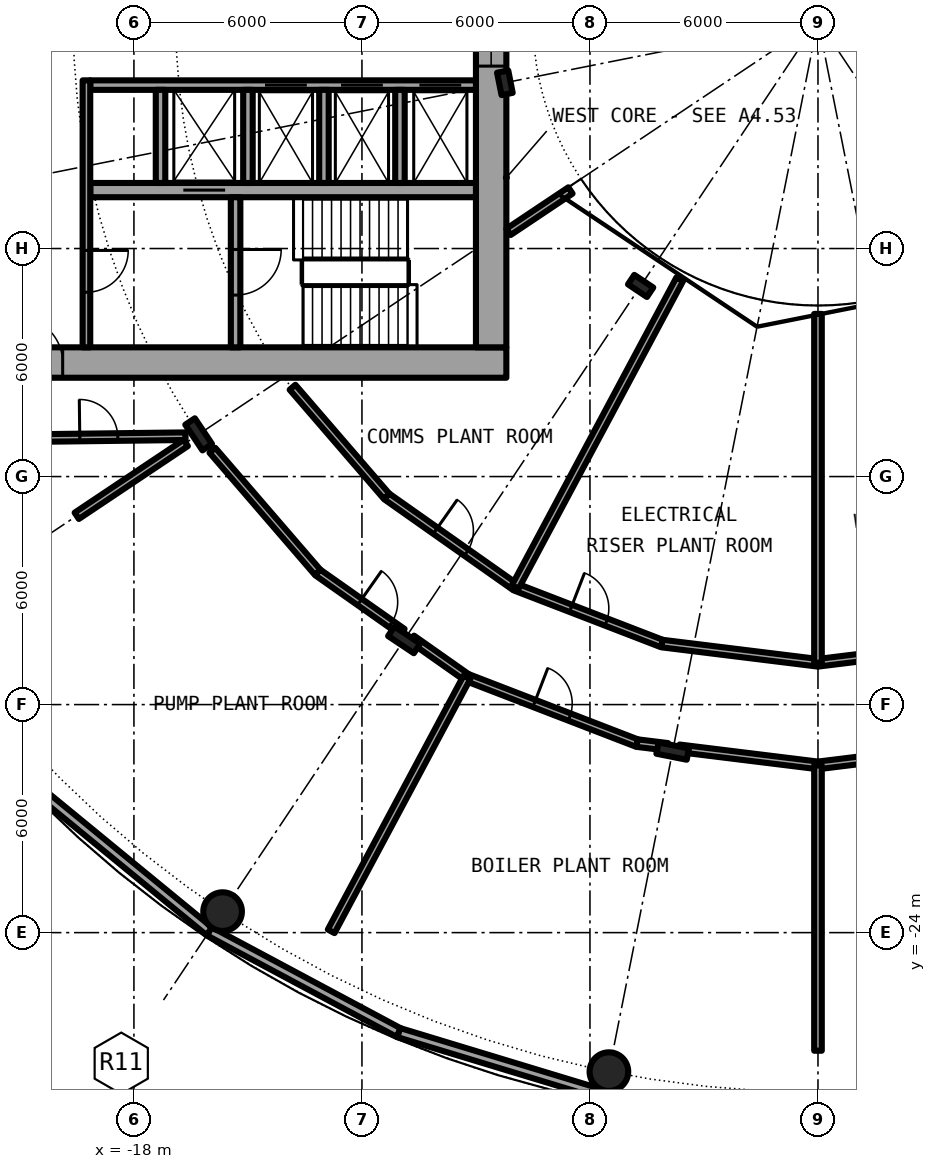
"""IFC4 building model, lengths in metres.
Left out: names, types, materials, properties, quantities, classifications, styles, units other than length and angle.
Written with IfcOpenShell. Run it as: python <this file> out.ifc"""

import sys

from ifc_helpers import new_model, si_unit, direction, frame, frame_2d, origin, origin_2d, place, context, subcontext, project, spatial, rectangle, hollow_circle, i_section, extrude, element, fill, save


model = new_model("IFC4")
c1 = context("Model", 3, precision=1e-05, world=origin(), true_north=direction((0.0, 1.0)))
c2 = subcontext(c1, "Body", "Model", "MODEL_VIEW")
j1 = project(units=[si_unit("LENGTHUNIT", "METRE"), si_unit("PLANEANGLEUNIT", "RADIAN")], contexts=[c1])
p1 = place(None, origin())
s1 = spatial("IfcSite", under=j1, at=p1, CompositionType="ELEMENT")
p2 = place(p1, origin())
s2 = spatial("IfcBuilding", under=s1, at=p2, CompositionType="ELEMENT")
p3 = place(p2, frame((0.0, 0.0, 18.3)))
s3 = spatial("IfcBuildingStorey", under=s2, at=p3, CompositionType="ELEMENT", Elevation=18.3)
for number, where, z_axis, x_axis in (
    (1, (-15.667, -23.448, 0.0), (0.0, 0.0, 1.0), (1.0, 0.0, 0.0)),
    (2, (-5.501, -27.658, 0.0), (0.0, 0.0, 1.0), (1.0, 0.0, 0.0)),
):
    element("IfcColumn", number, at=place(p3, frame(where, z_axis=z_axis, x_axis=x_axis)), inside=s3, PredefinedType="COLUMN", context=c2, shape_type="SweptSolid", body=[
        extrude(hollow_circle(Radius=0.508, WallThickness=0.05, at=origin_2d()), origin(), (0.0, 0.0, 1.0), 4.5),
    ])
for number, where, z_axis, x_axis in (
    (3, (-16.297, -10.889, 0.0), (0.0, 0.0, 1.0), (-0.831, -0.556, 0.0)),
    (4, (-10.889, -16.297, 0.0), (0.0, 0.0, 1.0), (-0.556, -0.831, 0.0)),
    (5, (-3.824, -19.223, 0.0), (0.0, 0.0, 1.0), (-0.195, -0.981, 0.0)),
):
    element("IfcColumn", number, at=place(p3, frame(where, z_axis=z_axis, x_axis=x_axis)), inside=s3, PredefinedType="COLUMN", context=c2, shape_type="SweptSolid", body=[
        extrude(i_section(OverallWidth=0.303, OverallDepth=0.814, WebThickness=0.021, FlangeThickness=0.04, FilletRadius=0.03, at=origin_2d()), origin(), (0.0, 0.0, 1.0), 4.5),
    ])
for number, where, z_axis, x_axis in (
    (6, (-8.239, -1.639, 0.0), (0.0, 0.0, 1.0), (-0.981, -0.195, 0.0)),
    (7, (-4.667, -6.984, 0.0), (0.0, 0.0, 1.0), (-0.556, -0.831, 0.0)),
):
    element("IfcColumn", number, at=place(p3, frame(where, z_axis=z_axis, x_axis=x_axis)), inside=s3, PredefinedType="COLUMN", context=c2, shape_type="SweptSolid", body=[
        extrude(i_section(OverallWidth=0.3, OverallDepth=0.6, WebThickness=0.015, FlangeThickness=0.03, FilletRadius=0.027, at=origin_2d()), origin(), (0.0, 0.0, 1.0), 4.5),
    ])
p4 = place(p3, frame((-20.382, -20.382, 0.0), z_axis=(0.0, 0.0, 1.0), x_axis=(0.773001659186, -0.634403999748, 0.0)))
e8 = element("IfcWall", 8, at=p4, inside=s3, PredefinedType="SOLIDWALL", context=c2, shape_type="SweptSolid", body=[
    extrude(rectangle(XDim=5.651, YDim=0.25, at=frame_2d((2.825, 0.0))), origin(), (0.0, 0.0, 1.0), 4.15),
])
p5 = place(p3, frame((-16.014, -23.967, 0.0), z_axis=(0.0, 0.0, 1.0), x_axis=(0.881874058161, -0.471485042756, 0.0)))
e9 = element("IfcWall", 9, at=p5, inside=s3, PredefinedType="SOLIDWALL", context=c2, shape_type="SweptSolid", body=[
    extrude(rectangle(XDim=5.65, YDim=0.25, at=frame_2d((2.825, 0.0))), origin(), (0.0, 0.0, 1.0), 4.15),
])
p6 = place(p3, frame((-11.031, -26.631, 0.0), z_axis=(0.0, 0.0, 1.0), x_axis=(0.956969521741, -0.29018844646, 0.0)))
e10 = element("IfcWall", 10, at=p6, inside=s3, PredefinedType="SOLIDWALL", context=c2, shape_type="SweptSolid", body=[
    extrude(rectangle(XDim=5.651, YDim=0.25, at=frame_2d((2.826, 0.0))), origin(), (0.0, 0.0, 1.0), 4.15),
])
p7 = place(p3, frame((-22.4, -9.0, 0.0), z_axis=(0.0, 0.0, 1.0), x_axis=(1.0, 0.0, 0.0)))
e11 = element("IfcWall", 11, at=p7, inside=s3, PredefinedType="SHEAR", context=c2, shape_type="SweptSolid", body=[
    extrude(rectangle(XDim=14.2, YDim=0.8, at=frame_2d((7.1, 0.0))), origin(), (0.0, 0.0, 1.0), 4.5),
])
p8 = place(p7, frame((1.325, 0.0, 0.0)))
e12 = element("IfcOpeningElement", 12, at=p8, cuts=e11, PredefinedType="OPENING", context=c2, shape_type="SweptSolid", body=[
    extrude(rectangle(XDim=1.2, YDim=2.3, at=frame_2d((0.6, 1.15))), frame((0.0, 0.41, 0.0), z_axis=(0.0, -1.0, 0.0), x_axis=(1.0, 0.0, 0.0)), (0.0, 0.0, 1.0), 0.82),
])
p9 = place(p3, frame((-8.6, 8.6, 0.0), z_axis=(0.0, 0.0, 1.0), x_axis=(0.0, -1.0, 0.0)))
e13 = element("IfcWall", 13, at=p9, inside=s3, PredefinedType="SHEAR", context=c2, shape_type="SweptSolid", body=[
    extrude(rectangle(XDim=17.2, YDim=0.8, at=frame_2d((8.6, 0.0))), origin(), (0.0, 0.0, 1.0), 4.5),
])
p10 = place(p9, frame((7.4, 0.0, 0.1)))
e14 = element("IfcOpeningElement", 14, at=p10, cuts=e13, PredefinedType="OPENING", context=c2, shape_type="SweptSolid", body=[
    extrude(rectangle(XDim=2.4, YDim=2.2, at=frame_2d((1.2, 1.1))), frame((0.0, 0.41, 0.0), z_axis=(0.0, -1.0, 0.0), x_axis=(1.0, 0.0, 0.0)), (0.0, 0.0, 1.0), 0.82),
])
p11 = place(p3, frame((-9.0, -1.7, 0.0), z_axis=(0.0, 0.0, 1.0), x_axis=(-1.0, 0.0, 0.0)))
e15 = element("IfcWall", 15, at=p11, inside=s3, PredefinedType="SHEAR", context=c2, shape_type="SweptSolid", body=[
    extrude(rectangle(XDim=10.15, YDim=0.25, at=frame_2d((5.075, 0.0))), origin(), (0.0, 0.0, 1.0), 4.5),
])
p12 = place(p11, frame((0.387, 0.0, 0.0)))
e16 = element("IfcOpeningElement", 16, at=p12, cuts=e15, PredefinedType="OPENING", context=c2, shape_type="SweptSolid", body=[
    extrude(rectangle(XDim=1.1, YDim=2.3, at=frame_2d((0.55, 1.15))), frame((0.0, 0.135, 0.0), z_axis=(0.0, -1.0, 0.0), x_axis=(1.0, 0.0, 0.0)), (0.0, 0.0, 1.0), 0.27),
])
p13 = place(p11, frame((2.45, 0.0, 0.0)))
e17 = element("IfcOpeningElement", 17, at=p13, cuts=e15, PredefinedType="OPENING", context=c2, shape_type="SweptSolid", body=[
    extrude(rectangle(XDim=1.1, YDim=2.3, at=frame_2d((0.55, 1.15))), frame((0.0, 0.135, 0.0), z_axis=(0.0, -1.0, 0.0), x_axis=(1.0, 0.0, 0.0)), (0.0, 0.0, 1.0), 0.27),
])
p14 = place(p11, frame((4.45, 0.0, 0.0)))
e18 = element("IfcOpeningElement", 18, at=p14, cuts=e15, PredefinedType="OPENING", context=c2, shape_type="SweptSolid", body=[
    extrude(rectangle(XDim=1.1, YDim=2.3, at=frame_2d((0.55, 1.15))), frame((0.0, 0.135, 0.0), z_axis=(0.0, -1.0, 0.0), x_axis=(1.0, 0.0, 0.0)), (0.0, 0.0, 1.0), 0.27),
])
p15 = place(p3, frame((-9.0, -4.462, 0.0), z_axis=(0.0, 0.0, 1.0), x_axis=(-1.0, 0.0, 0.0)))
e19 = element("IfcWall", 19, at=p15, inside=s3, PredefinedType="SHEAR", context=c2, shape_type="SweptSolid", body=[
    extrude(rectangle(XDim=10.15, YDim=0.375, at=frame_2d((5.075, 0.0))), origin(), (0.0, 0.0, 1.0), 4.5),
])
p16 = place(p15, frame((6.6, 0.0, 0.0)))
e20 = element("IfcOpeningElement", 20, at=p16, cuts=e19, PredefinedType="OPENING", context=c2, shape_type="SweptSolid", body=[
    extrude(rectangle(XDim=1.1, YDim=2.3, at=frame_2d((0.55, 1.15))), frame((0.0, 0.198, 0.0), z_axis=(0.0, -1.0, 0.0), x_axis=(1.0, 0.0, 0.0)), (0.0, 0.0, 1.0), 0.395),
])
p17 = place(p3, frame((-15.325, -4.65, 0.0), z_axis=(0.0, 0.0, 1.0), x_axis=(0.0, -1.0, 0.0)))
e21 = element("IfcWall", 21, at=p17, inside=s3, PredefinedType="SHEAR", context=c2, shape_type="SweptSolid", body=[
    extrude(rectangle(XDim=3.95, YDim=0.25, at=frame_2d((1.975, 0.0))), origin(), (0.0, 0.0, 1.0), 4.5),
])
p18 = place(p17, frame((1.375, 0.0, 0.0)))
e22 = element("IfcOpeningElement", 22, at=p18, cuts=e21, PredefinedType="OPENING", context=c2, shape_type="SweptSolid", body=[
    extrude(rectangle(XDim=1.2, YDim=2.3, at=frame_2d((0.6, 1.15))), frame((0.0, 0.135, 0.0), z_axis=(0.0, -1.0, 0.0), x_axis=(1.0, 0.0, 0.0)), (0.0, 0.0, 1.0), 0.27),
])
for number, where, z_axis, x_axis in (
    (23, (-15.0, -1.825, 0.0), (0.0, 0.0, 1.0), (0.0, -1.0, 0.0)),
    (24, (-17.3, -1.825, 0.0), (0.0, 0.0, 1.0), (0.0, -1.0, 0.0)),
):
    element("IfcWall", number, at=place(p3, frame(where, z_axis=z_axis, x_axis=x_axis)), inside=s3, PredefinedType="SOLIDWALL", context=c2, shape_type="SweptSolid", body=[
        extrude(rectangle(XDim=2.45, YDim=0.25, at=frame_2d((1.225, 0.0))), origin(), (0.0, 0.0, 1.0), 4.15),
    ])
p19 = place(p3, frame((-19.25, -1.575, 0.0), z_axis=(0.0, 0.0, 1.0), x_axis=(0.0, -1.0, 0.0)))
e25 = element("IfcWall", 25, at=p19, inside=s3, PredefinedType="SOLIDWALL", context=c2, shape_type="SweptSolid", body=[
    extrude(rectangle(XDim=7.025, YDim=0.2, at=frame_2d((3.513, 0.0))), origin(), (0.0, 0.0, 1.0), 4.15),
])
p20 = place(p19, frame((4.475, 0.0, 0.0)))
e26 = element("IfcOpeningElement", 26, at=p20, cuts=e25, PredefinedType="OPENING", context=c2, shape_type="SweptSolid", body=[
    extrude(rectangle(XDim=1.1, YDim=2.3, at=frame_2d((0.55, 1.15))), frame((0.0, 0.11, 0.0), z_axis=(0.0, -1.0, 0.0), x_axis=(1.0, 0.0, 0.0)), (0.0, 0.0, 1.0), 0.22),
])
for number, where, z_axis, x_axis in (
    (27, (-11.0, -1.825, 0.0), (0.0, 0.0, 1.0), (0.0, -1.0, 0.0)),
    (28, (-13.0, -1.825, 0.0), (0.0, 0.0, 1.0), (0.0, -1.0, 0.0)),
):
    element("IfcWall", number, at=place(p3, frame(where, z_axis=z_axis, x_axis=x_axis)), inside=s3, PredefinedType="SOLIDWALL", context=c2, shape_type="SweptSolid", body=[
        extrude(rectangle(XDim=2.45, YDim=0.25, at=frame_2d((1.225, 0.0))), origin(), (0.0, 0.0, 1.0), 4.15),
    ])
p21 = place(p3, frame((-15.935, -11.309, 0.0), z_axis=(0.0, 0.0, 1.0), x_axis=(0.653128497371, -0.757247097005, 0.0)))
e29 = element("IfcWall", 29, at=p21, inside=s3, PredefinedType="PARTITIONING", context=c2, shape_type="SweptSolid", body=[
    extrude(rectangle(XDim=4.244, YDim=0.2, at=frame_2d((2.122, 0.0))), origin(), (0.0, 0.0, 1.0), 3.73),
])
p22 = place(p3, frame((-13.163, -14.523, 0.0), z_axis=(0.0, 0.0, 1.0), x_axis=(0.817595540973, -0.575792958781, 0.0)))
e30 = element("IfcWall", 30, at=p22, inside=s3, PredefinedType="PARTITIONING", context=c2, shape_type="SweptSolid", body=[
    extrude(rectangle(XDim=2.725, YDim=0.2, at=frame_2d((1.363, 0.0))), origin(), (0.0, 0.0, 1.0), 3.73),
])
p23 = place(p22, frame((1.35, 0.0, 0.0)))
e31 = element("IfcOpeningElement", 31, at=p23, cuts=e30, PredefinedType="OPENING", context=c2, shape_type="SweptSolid", body=[
    extrude(rectangle(XDim=1.0, YDim=2.3, at=frame_2d((0.5, 1.15))), frame((0.0, 0.11, 0.0), z_axis=(0.0, -1.0, 0.0), x_axis=(1.0, 0.0, 0.0)), (0.0, 0.0, 1.0), 0.22),
])
p24 = place(p3, frame((-10.687, -16.267, 0.0), z_axis=(0.0, 0.0, 1.0), x_axis=(0.817849682833, -0.575431921508, 0.0)))
e32 = element("IfcWall", 32, at=p24, inside=s3, PredefinedType="PARTITIONING", context=c2, shape_type="SweptSolid", body=[
    extrude(rectangle(XDim=1.771, YDim=0.2, at=frame_2d((0.885, 0.0))), origin(), (0.0, 0.0, 1.0), 3.73),
])
p25 = place(p3, frame((-9.239, -17.286, 0.0), z_axis=(0.0, 0.0, 1.0), x_axis=(0.932988479706, -0.359906233255, 0.0)))
e33 = element("IfcWall", 33, at=p25, inside=s3, PredefinedType="PARTITIONING", context=c2, shape_type="SweptSolid", body=[
    extrude(rectangle(XDim=4.799, YDim=0.2, at=frame_2d((2.399, 0.0))), origin(), (0.0, 0.0, 1.0), 3.73),
])
p26 = place(p25, frame((1.899, 0.0, 0.0)))
e34 = element("IfcOpeningElement", 34, at=p26, cuts=e33, PredefinedType="OPENING", context=c2, shape_type="SweptSolid", body=[
    extrude(rectangle(XDim=1.0, YDim=2.3, at=frame_2d((0.5, 1.15))), frame((0.0, 0.11, 0.0), z_axis=(0.0, -1.0, 0.0), x_axis=(1.0, 0.0, 0.0)), (0.0, 0.0, 1.0), 0.22),
])
p27 = place(p3, frame((-4.762, -19.013, 0.0), z_axis=(0.0, 0.0, 1.0), x_axis=(0.992521102393, -0.122073180119, 0.0)))
e35 = element("IfcWall", 35, at=p27, inside=s3, PredefinedType="PARTITIONING", context=c2, shape_type="SweptSolid", body=[
    extrude(rectangle(XDim=0.812, YDim=0.2, at=frame_2d((0.406, 0.0))), origin(), (0.0, 0.0, 1.0), 3.73),
])
for number, where, z_axis, x_axis in (
    (36, (-3.655, -19.15, 0.0), (0.0, 0.0, 1.0), (0.992, -0.122, 0.0)),
    (37, (0.0, -19.6, 0.0), (0.0, 0.0, 1.0), (0.992, 0.122, 0.0)),
):
    element("IfcWall", number, at=place(p3, frame(where, z_axis=z_axis, x_axis=x_axis)), inside=s3, PredefinedType="PARTITIONING", context=c2, shape_type="SweptSolid", body=[
        extrude(rectangle(XDim=3.683, YDim=0.2, at=frame_2d((1.841, 0.0))), origin(), (0.0, 0.0, 1.0), 3.73),
    ])
p28 = place(p3, frame((-13.827, -9.65, 0.0), z_axis=(0.0, 0.0, 1.0), x_axis=(0.653220956969, -0.757167340406, 0.0)))
e38 = element("IfcWall", 38, at=p28, inside=s3, PredefinedType="PARTITIONING", context=c2, shape_type="SweptSolid", body=[
    extrude(rectangle(XDim=3.793, YDim=0.2, at=frame_2d((1.896, 0.0))), origin(), (0.0, 0.0, 1.0), 4.15),
])
p29 = place(p3, frame((-11.349, -12.522, 0.0), z_axis=(0.0, 0.0, 1.0), x_axis=(0.817567680547, -0.575832517079, 0.0)))
e39 = element("IfcWall", 39, at=p29, inside=s3, PredefinedType="PARTITIONING", context=c2, shape_type="SweptSolid", body=[
    extrude(rectangle(XDim=4.137, YDim=0.2, at=frame_2d((2.068, 0.0))), origin(), (0.0, 0.0, 1.0), 4.15),
])
p30 = place(p29, frame((1.568, 0.0, 0.0)))
e40 = element("IfcOpeningElement", 40, at=p30, cuts=e39, PredefinedType="OPENING", context=c2, shape_type="SweptSolid", body=[
    extrude(rectangle(XDim=1.0, YDim=2.3, at=frame_2d((0.5, 1.15))), frame((0.0, 0.11, 0.0), z_axis=(0.0, -1.0, 0.0), x_axis=(1.0, 0.0, 0.0)), (0.0, 0.0, 1.0), 0.22),
])
p31 = place(p3, frame((-7.967, -14.904, 0.0), z_axis=(0.0, 0.0, 1.0), x_axis=(0.932943640288, -0.360022449363, 0.0)))
e41 = element("IfcWall", 41, at=p31, inside=s3, PredefinedType="PARTITIONING", context=c2, shape_type="SweptSolid", body=[
    extrude(rectangle(XDim=4.139, YDim=0.2, at=frame_2d((2.069, 0.0))), origin(), (0.0, 0.0, 1.0), 4.15),
])
p32 = place(p31, frame((1.569, 0.0, 0.0)))
e42 = element("IfcOpeningElement", 42, at=p32, cuts=e41, PredefinedType="OPENING", context=c2, shape_type="SweptSolid", body=[
    extrude(rectangle(XDim=1.0, YDim=2.3, at=frame_2d((0.5, 1.15))), frame((0.0, 0.11, 0.0), z_axis=(0.0, -1.0, 0.0), x_axis=(1.0, 0.0, 0.0)), (0.0, 0.0, 1.0), 0.22),
])
for number, where, z_axis, x_axis in (
    (43, (-4.106, -16.394, 0.0), (0.0, 0.0, 1.0), (0.992, -0.122, 0.0)),
    (44, (0.0, -16.9, 0.0), (0.0, 0.0, 1.0), (0.992, 0.122, 0.0)),
):
    element("IfcWall", number, at=place(p3, frame(where, z_axis=z_axis, x_axis=x_axis)), inside=s3, PredefinedType="PARTITIONING", context=c2, shape_type="SweptSolid", body=[
        extrude(rectangle(XDim=4.137, YDim=0.2, at=frame_2d((2.068, 0.0))), origin(), (0.0, 0.0, 1.0), 4.15),
    ])
p33 = place(p3, frame((-21.675, -11.0, 0.0), z_axis=(0.0, 0.0, 1.0), x_axis=(0.999924074118, 0.012322580895, 0.0)))
e45 = element("IfcWall", 45, at=p33, inside=s3, PredefinedType="PARTITIONING", context=c2, shape_type="SweptSolid", body=[
    extrude(rectangle(XDim=5.032, YDim=0.2, at=frame_2d((2.516, 0.0))), origin(), (0.0, 0.0, 1.0), 4.15),
])
p34 = place(p33, frame((2.25, 0.0, 0.0)))
e46 = element("IfcOpeningElement", 46, at=p34, cuts=e45, PredefinedType="OPENING", context=c2, shape_type="SweptSolid", body=[
    extrude(rectangle(XDim=1.0, YDim=2.3, at=frame_2d((0.5, 1.15))), frame((0.0, 0.11, 0.0), z_axis=(0.0, -1.0, 0.0), x_axis=(1.0, 0.0, 0.0)), (0.0, 0.0, 1.0), 0.22),
])
p35 = place(p3, frame((-6.513, -4.472, 0.0), z_axis=(0.0, 0.0, 1.0), x_axis=(-0.831417956244, -0.555647533996, 0.0)))
e47 = element("IfcWall", 47, at=p35, inside=s3, PredefinedType="PARTITIONING", context=c2, shape_type="SweptSolid", body=[
    extrude(rectangle(XDim=1.962, YDim=0.2, at=frame_2d((0.981, 0.0))), origin(), (0.0, 0.0, 1.0), 4.15),
])
p36 = place(p3, frame((-12.81, -23.966, 0.0), z_axis=(0.0, 0.0, 1.0), x_axis=(0.471439510802, 0.881898399848, 0.0)))
e48 = element("IfcWall", 48, at=p36, inside=s3, PredefinedType="PARTITIONING", context=c2, shape_type="SweptSolid", body=[
    extrude(rectangle(XDim=7.575, YDim=0.2, at=frame_2d((3.787, 0.0))), origin(), (0.0, 0.0, 1.0), 4.15),
])
p37 = place(p3, frame((-7.966, -14.905, 0.0), z_axis=(0.0, 0.0, 1.0), x_axis=(0.471460365694, 0.881887251059, 0.0)))
e49 = element("IfcWall", 49, at=p37, inside=s3, PredefinedType="PARTITIONING", context=c2, shape_type="SweptSolid", body=[
    extrude(rectangle(XDim=9.18, YDim=0.2, at=frame_2d((4.59, 0.0))), origin(), (0.0, 0.0, 1.0), 4.15),
])
p38 = place(p3, frame((0.0, -27.108, 0.0), z_axis=(0.0, 0.0, 1.0), x_axis=(0.0, 1.0, 0.0)))
e50 = element("IfcWall", 50, at=p38, inside=s3, PredefinedType="PARTITIONING", context=c2, shape_type="SweptSolid", body=[
    extrude(rectangle(XDim=7.508, YDim=0.2, at=frame_2d((3.754, 0.0))), origin(), (0.0, 0.0, 1.0), 4.15),
])
p39 = place(p3, frame((0.0, -16.9, 0.0), z_axis=(0.0, 0.0, 1.0), x_axis=(0.0, 1.0, 0.0)))
e51 = element("IfcWall", 51, at=p39, inside=s3, PredefinedType="PARTITIONING", context=c2, shape_type="SweptSolid", body=[
    extrude(rectangle(XDim=9.18, YDim=0.2, at=frame_2d((4.59, 0.0))), origin(), (0.0, 0.0, 1.0), 4.15),
])
p40 = place(p3, frame((-19.505, -13.033, 0.0), z_axis=(0.0, 0.0, 1.0), x_axis=(0.831331256958, 0.555777240632, 0.0)))
e52 = element("IfcWall", 52, at=p40, inside=s3, PredefinedType="PARTITIONING", context=c2, shape_type="SweptSolid", body=[
    extrude(rectangle(XDim=3.451, YDim=0.2, at=frame_2d((1.726, 0.0))), origin(), (0.0, 0.0, 1.0), 3.23),
])
p41 = place(p12, origin())
e53 = element("IfcDoor", 53, at=p41, inside=s3, OperationType="DOUBLE_DOOR_SLIDING", PredefinedType="DOOR", context=c2, shape_type="SweptSolid", body=[
    extrude(rectangle(XDim=1.1, YDim=2.3, at=frame_2d((0.55, 1.15))), frame((0.0, 0.025, 0.0), z_axis=(0.0, -1.0, 0.0), x_axis=(1.0, 0.0, 0.0)), (0.0, 0.0, 1.0), 0.05),
])
fill(e16, e53)
p42 = place(p13, origin())
e54 = element("IfcDoor", 54, at=p42, inside=s3, OperationType="DOUBLE_DOOR_SLIDING", PredefinedType="DOOR", context=c2, shape_type="SweptSolid", body=[
    extrude(rectangle(XDim=1.1, YDim=2.3, at=frame_2d((0.55, 1.15))), frame((0.0, 0.025, 0.0), z_axis=(0.0, -1.0, 0.0), x_axis=(1.0, 0.0, 0.0)), (0.0, 0.0, 1.0), 0.05),
])
fill(e17, e54)
p43 = place(p14, origin())
e55 = element("IfcDoor", 55, at=p43, inside=s3, OperationType="DOUBLE_DOOR_SLIDING", PredefinedType="DOOR", context=c2, shape_type="SweptSolid", body=[
    extrude(rectangle(XDim=1.1, YDim=2.3, at=frame_2d((0.55, 1.15))), frame((0.0, 0.025, 0.0), z_axis=(0.0, -1.0, 0.0), x_axis=(1.0, 0.0, 0.0)), (0.0, 0.0, 1.0), 0.05),
])
fill(e18, e55)
p44 = place(p16, origin())
e56 = element("IfcDoor", 56, at=p44, inside=s3, OperationType="DOUBLE_DOOR_SLIDING", PredefinedType="DOOR", context=c2, shape_type="SweptSolid", body=[
    extrude(rectangle(XDim=1.1, YDim=2.3, at=frame_2d((0.55, 1.15))), frame((0.0, 0.025, 0.0), z_axis=(0.0, -1.0, 0.0), x_axis=(1.0, 0.0, 0.0)), (0.0, 0.0, 1.0), 0.05),
])
fill(e20, e56)
p45 = place(p18, origin())
e57 = element("IfcDoor", 57, at=p45, inside=s3, OperationType="SINGLE_SWING_LEFT", PredefinedType="DOOR", context=c2, shape_type="SweptSolid", body=[
    extrude(rectangle(XDim=1.2, YDim=2.3, at=frame_2d((0.6, 1.15))), frame((0.0, 0.025, 0.0), z_axis=(0.0, -1.0, 0.0), x_axis=(1.0, 0.0, 0.0)), (0.0, 0.0, 1.0), 0.05),
])
fill(e22, e57)
p46 = place(p20, origin())
e58 = element("IfcDoor", 58, at=p46, inside=s3, OperationType="SINGLE_SWING_LEFT", PredefinedType="DOOR", context=c2, shape_type="SweptSolid", body=[
    extrude(rectangle(XDim=1.1, YDim=2.3, at=frame_2d((0.55, 1.15))), frame((0.0, 0.025, 0.0), z_axis=(0.0, -1.0, 0.0), x_axis=(1.0, 0.0, 0.0)), (0.0, 0.0, 1.0), 0.05),
])
fill(e26, e58)
p47 = place(p8, origin())
e59 = element("IfcDoor", 59, at=p47, inside=s3, OperationType="SINGLE_SWING_RIGHT", PredefinedType="DOOR", context=c2, shape_type="SweptSolid", body=[
    extrude(rectangle(XDim=1.2, YDim=2.3, at=frame_2d((0.6, 1.15))), frame((0.0, 0.025, 0.0), z_axis=(0.0, -1.0, 0.0), x_axis=(1.0, 0.0, 0.0)), (0.0, 0.0, 1.0), 0.05),
])
fill(e12, e59)
p48 = place(p10, origin())
e60 = element("IfcWindow", 60, at=p48, inside=s3, PartitioningType="SINGLE_PANEL", PredefinedType="WINDOW", context=c2, shape_type="SweptSolid", body=[
    extrude(rectangle(XDim=2.4, YDim=2.2, at=frame_2d((1.2, 1.1))), frame((0.0, 0.03, 0.0), z_axis=(0.0, -1.0, 0.0), x_axis=(1.0, 0.0, 0.0)), (0.0, 0.0, 1.0), 0.06),
])
fill(e14, e60)
p49 = place(p23, origin())
e61 = element("IfcDoor", 61, at=p49, inside=s3, OperationType="SINGLE_SWING_RIGHT", PredefinedType="DOOR", context=c2, shape_type="SweptSolid", body=[
    extrude(rectangle(XDim=1.0, YDim=2.3, at=frame_2d((0.5, 1.15))), frame((0.0, 0.025, 0.0), z_axis=(0.0, -1.0, 0.0), x_axis=(1.0, 0.0, 0.0)), (0.0, 0.0, 1.0), 0.05),
])
fill(e31, e61)
p50 = place(p26, origin())
e62 = element("IfcDoor", 62, at=p50, inside=s3, OperationType="SINGLE_SWING_RIGHT", PredefinedType="DOOR", context=c2, shape_type="SweptSolid", body=[
    extrude(rectangle(XDim=1.0, YDim=2.3, at=frame_2d((0.5, 1.15))), frame((0.0, 0.025, 0.0), z_axis=(0.0, -1.0, 0.0), x_axis=(1.0, 0.0, 0.0)), (0.0, 0.0, 1.0), 0.05),
])
fill(e34, e62)
p51 = place(p30, origin())
e63 = element("IfcDoor", 63, at=p51, inside=s3, OperationType="SINGLE_SWING_RIGHT", PredefinedType="DOOR", context=c2, shape_type="SweptSolid", body=[
    extrude(rectangle(XDim=1.0, YDim=2.3, at=frame_2d((0.5, 1.15))), frame((0.0, 0.025, 0.0), z_axis=(0.0, -1.0, 0.0), x_axis=(1.0, 0.0, 0.0)), (0.0, 0.0, 1.0), 0.05),
])
fill(e40, e63)
p52 = place(p32, origin())
e64 = element("IfcDoor", 64, at=p52, inside=s3, OperationType="SINGLE_SWING_LEFT", PredefinedType="DOOR", context=c2, shape_type="SweptSolid", body=[
    extrude(rectangle(XDim=1.0, YDim=2.3, at=frame_2d((0.5, 1.15))), frame((0.0, 0.025, 0.0), z_axis=(0.0, -1.0, 0.0), x_axis=(1.0, 0.0, 0.0)), (0.0, 0.0, 1.0), 0.05),
])
fill(e42, e64)
p53 = place(p34, origin())
e65 = element("IfcDoor", 65, at=p53, inside=s3, OperationType="SINGLE_SWING_RIGHT", PredefinedType="DOOR", context=c2, shape_type="SweptSolid", body=[
    extrude(rectangle(XDim=1.0, YDim=2.3, at=frame_2d((0.5, 1.15))), frame((0.0, 0.025, 0.0), z_axis=(0.0, -1.0, 0.0), x_axis=(1.0, 0.0, 0.0)), (0.0, 0.0, 1.0), 0.05),
])
fill(e46, e65)
save(model, sys.argv[1])
